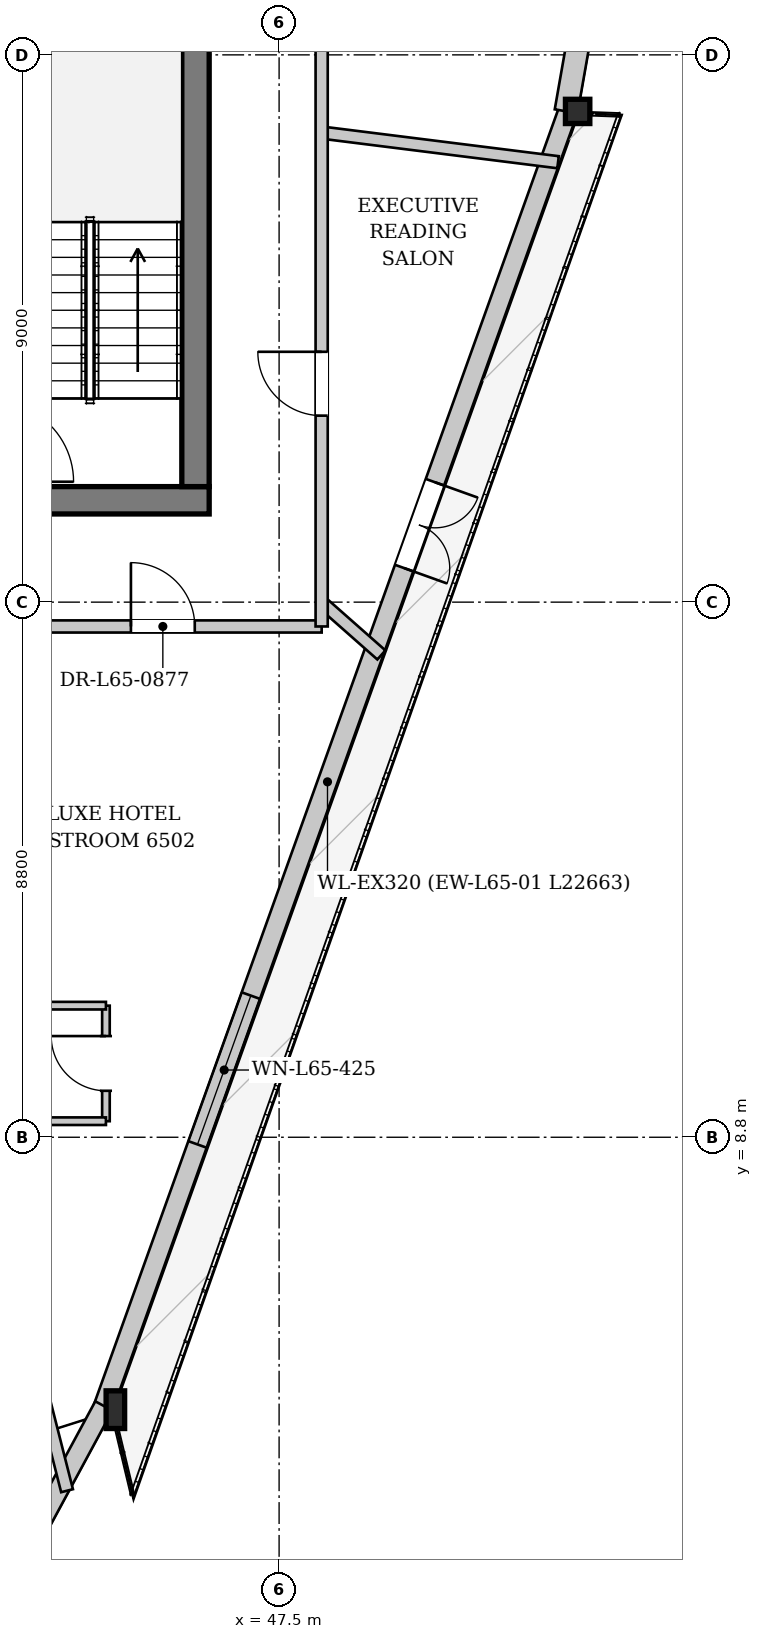
"""IFC4 building model, lengths in metres.
Left out: names, types, materials, properties, quantities, classifications, styles, units other than length and angle.
Written with IfcOpenShell. Run it as: python <this file> out.ifc"""

import sys

from ifc_helpers import new_model, si_unit, direction, frame, frame_2d, origin, origin_2d, place, context, subcontext, project, spatial, rectangle, i_section, extrude, source, transform, mapped, element, fill, save


model = new_model("IFC4")
c1 = context("Model", 3, precision=1e-05, world=origin(), true_north=direction((0.0, 1.0)))
c2 = subcontext(c1, "Body", "Model", "MODEL_VIEW")
j1 = project(units=[si_unit("LENGTHUNIT", "METRE"), si_unit("PLANEANGLEUNIT", "RADIAN")], contexts=[c1])
p1 = place(None, origin())
s1 = spatial("IfcSite", under=j1, at=p1, CompositionType="ELEMENT")
p2 = place(p1, origin())
s2 = spatial("IfcBuilding", under=s1, at=p2, CompositionType="ELEMENT")
p3 = place(p2, frame((0.0, 0.0, 245.3)))
s3 = spatial("IfcBuildingStorey", under=s2, at=p3, CompositionType="ELEMENT", Elevation=245.3)
m1 = source(origin(), c2, "Body", "SweptSolid", [
    extrude(i_section(OverallWidth=0.305, OverallDepth=0.62, WebThickness=0.021, FlangeThickness=0.04, at=origin_2d()), origin(), (0.0, 0.0, 1.0), 3.437),
])
p4 = place(p3, frame((44.759, 4.305, 0.0), z_axis=(0.028274763341, 0.008667138512, 0.999562613581), x_axis=(-0.293072848881, 0.956090113561, 0.0)))
e1 = element("IfcColumn", 1, at=p4, inside=s3, PredefinedType="COLUMN", context=c2, shape_type="MappedRepresentation", body=[
    mapped(m1, transform((0.0, 0.0, 0.0), x_axis=(1.0, 0.0, 0.0), y_axis=(0.0, 1.0, 0.0), z_axis=(0.0, 0.0, 1.0), scale=1.0)),
])
m2 = source(origin(), c2, "Body", "SweptSolid", [
    extrude(i_section(OverallWidth=0.401, OverallDepth=0.399, WebThickness=0.022, FlangeThickness=0.034, at=origin_2d()), origin(), (0.0, 0.0, 1.0), 3.436),
])
p5 = place(p3, frame((52.408, 25.639, 0.0), z_axis=(0.001208042101, 0.018262754122, 0.999832492194), x_axis=(-0.997819383739, 0.066003616823, 0.0)))
e2 = element("IfcColumn", 2, at=p5, inside=s3, PredefinedType="COLUMN", context=c2, shape_type="MappedRepresentation", body=[
    mapped(m2, transform((0.0, 0.0, 0.0), x_axis=(1.0, 0.0, 0.0), y_axis=(0.0, 1.0, 0.0), z_axis=(0.0, 0.0, 1.0), scale=1.0)),
])
p6 = place(p3, frame((52.257, 25.693, 0.0), z_axis=(0.0, 0.0, 1.0), x_axis=(-0.337512626034, -0.941321001183, 0.0)))
e3 = element("IfcWall", 3, at=p6, inside=s3, PredefinedType="SOLIDWALL", context=c2, shape_type="SweptSolid", body=[
    extrude(rectangle(XDim=22.663, YDim=0.32, at=frame_2d((11.332, 0.0))), origin(), (0.0, 0.0, 1.0), 2.872),
])
p7 = place(p6, frame((6.502, 0.0, 0.0)))
e4 = element("IfcOpeningElement", 4, at=p7, cuts=e3, PredefinedType="OPENING", context=c2, shape_type="SweptSolid", body=[
    extrude(rectangle(XDim=1.5, YDim=2.3, at=frame_2d((0.75, 1.15))), frame((0.0, 0.17, 0.0), z_axis=(0.0, -1.0, 0.0), x_axis=(1.0, 0.0, 0.0)), (0.0, 0.0, 1.0), 0.34),
])
p8 = place(p6, frame((15.471, 0.0, 0.402)))
e5 = element("IfcOpeningElement", 5, at=p8, cuts=e3, PredefinedType="OPENING", context=c2, shape_type="SweptSolid", body=[
    extrude(rectangle(XDim=2.6, YDim=2.35, at=frame_2d((1.3, 1.175))), frame((0.0, 0.17, 0.0), z_axis=(0.0, -1.0, 0.0), x_axis=(1.0, 0.0, 0.0)), (0.0, 0.0, 1.0), 0.34),
])
p9 = place(p3, frame((44.618, 4.381, 0.0), z_axis=(0.0, 0.0, 1.0), x_axis=(-0.475317706238, -0.879814229333, 0.0)))
e6 = element("IfcWall", 6, at=p9, inside=s3, PredefinedType="SOLIDWALL", context=c2, shape_type="SweptSolid", body=[
    extrude(rectangle(XDim=3.382, YDim=0.32, at=frame_2d((1.691, 0.0))), origin(), (0.0, 0.0, 1.0), 2.872),
])
p10 = place(p3, frame((56.146, 47.992, 0.0), z_axis=(0.0, 0.0, 1.0), x_axis=(-0.173221161048, -0.984882952114, 0.0)))
e7 = element("IfcWall", 7, at=p10, inside=s3, PredefinedType="SOLIDWALL", context=c2, shape_type="SweptSolid", body=[
    extrude(rectangle(XDim=22.663, YDim=0.38, at=frame_2d((11.332, 0.0))), origin(), (0.0, 0.0, 1.0), 2.872),
])
p11 = place(p10, frame((5.746, 0.0, 0.65)))
e8 = element("IfcOpeningElement", 8, at=p11, cuts=e7, PredefinedType="OPENING", context=c2, shape_type="SweptSolid", body=[
    extrude(rectangle(XDim=1.2, YDim=1.5, at=frame_2d((0.6, 0.75))), frame((0.0, 0.2, 0.0), z_axis=(0.0, -1.0, 0.0), x_axis=(1.0, 0.0, 0.0)), (0.0, 0.0, 1.0), 0.4),
])
p12 = place(p10, frame((15.718, 0.0, 0.65)))
e9 = element("IfcOpeningElement", 9, at=p12, cuts=e7, PredefinedType="OPENING", context=c2, shape_type="SweptSolid", body=[
    extrude(rectangle(XDim=1.2, YDim=1.5, at=frame_2d((0.6, 0.75))), frame((0.0, 0.2, 0.0), z_axis=(0.0, -1.0, 0.0), x_axis=(1.0, 0.0, 0.0)), (0.0, 0.0, 1.0), 0.4),
])
p13 = place(p3, frame((46.35, 19.275, 0.0), z_axis=(0.0, 0.0, 1.0), x_axis=(-1.0, 0.0, 0.0)))
e10 = element("IfcWall", 10, at=p13, inside=s3, PredefinedType="SHEAR", context=c2, shape_type="SweptSolid", body=[
    extrude(rectangle(XDim=16.7, YDim=0.45, at=frame_2d((8.35, 0.0))), origin(), (0.0, 0.0, 1.0), 3.38),
])
p14 = place(p13, frame((4.55, 0.0, 0.0)))
e11 = element("IfcOpeningElement", 11, at=p14, cuts=e10, PredefinedType="OPENING", context=c2, shape_type="SweptSolid", body=[
    extrude(rectangle(XDim=1.12, YDim=2.25, at=frame_2d((0.56, 1.125))), frame((0.0, 0.235, 0.0), z_axis=(0.0, -1.0, 0.0), x_axis=(1.0, 0.0, 0.0)), (0.0, 0.0, 1.0), 0.47),
])
p15 = place(p13, frame((11.05, 0.0, 0.0)))
e12 = element("IfcOpeningElement", 12, at=p15, cuts=e10, PredefinedType="OPENING", context=c2, shape_type="SweptSolid", body=[
    extrude(rectangle(XDim=1.12, YDim=2.25, at=frame_2d((0.56, 1.125))), frame((0.0, 0.235, 0.0), z_axis=(0.0, -1.0, 0.0), x_axis=(1.0, 0.0, 0.0)), (0.0, 0.0, 1.0), 0.47),
])
p16 = place(p3, frame((46.125, 33.7, 0.0), z_axis=(0.0, 0.0, 1.0), x_axis=(0.0, -1.0, 0.0)))
e13 = element("IfcWall", 13, at=p16, inside=s3, PredefinedType="SHEAR", context=c2, shape_type="SweptSolid", body=[
    extrude(rectangle(XDim=14.2, YDim=0.45, at=frame_2d((7.1, 0.0))), origin(), (0.0, 0.0, 1.0), 3.38),
])
p17 = place(p16, frame((5.18, 0.0, 0.0)))
e14 = element("IfcOpeningElement", 14, at=p17, cuts=e13, PredefinedType="OPENING", context=c2, shape_type="SweptSolid", body=[
    extrude(rectangle(XDim=1.6, YDim=2.2, at=frame_2d((0.8, 1.1))), frame((0.0, 0.235, 0.0), z_axis=(0.0, -1.0, 0.0), x_axis=(1.0, 0.0, 0.0)), (0.0, 0.0, 1.0), 0.47),
])
p18 = place(p16, frame((2.05, 0.0, 0.0)))
e15 = element("IfcOpeningElement", 15, at=p18, cuts=e13, PredefinedType="OPENING", context=c2, shape_type="SweptSolid", body=[
    extrude(rectangle(XDim=0.95, YDim=2.1, at=frame_2d((0.475, 1.05))), frame((0.0, 0.235, 0.0), z_axis=(0.0, -1.0, 0.0), x_axis=(1.0, 0.0, 0.0)), (0.0, 0.0, 1.0), 0.47),
])
p19 = place(p3, frame((40.394, 17.2, 0.0), z_axis=(0.0, 0.0, 1.0), x_axis=(0.246751762968, -0.969078720988, 0.0)))
e16 = element("IfcWall", 16, at=p19, inside=s3, PredefinedType="PARTITIONING", context=c2, shape_type="SweptSolid", body=[
    extrude(rectangle(XDim=14.666, YDim=0.2, at=frame_2d((7.333, 0.0))), origin(), (0.0, 0.0, 1.0), 3.055),
])
p20 = place(p3, frame((48.2, 17.598, 0.0), z_axis=(0.0, 0.0, 1.0), x_axis=(0.749810659064, -0.661652458284, 0.0)))
e17 = element("IfcWall", 17, at=p20, inside=s3, PredefinedType="PARTITIONING", context=c2, shape_type="SweptSolid", body=[
    extrude(rectangle(XDim=1.31, YDim=0.2, at=frame_2d((0.655, 0.0))), origin(), (0.0, 0.0, 1.0), 3.38),
])
p21 = place(p3, frame((48.2, 25.322, 0.0), z_axis=(0.0, 0.0, 1.0), x_axis=(0.992243327494, -0.124310816274, 0.0)))
e18 = element("IfcWall", 18, at=p21, inside=s3, PredefinedType="PARTITIONING", context=c2, shape_type="SweptSolid", body=[
    extrude(rectangle(XDim=3.918, YDim=0.2, at=frame_2d((1.959, 0.0))), origin(), (0.0, 0.0, 1.0), 3.38),
])
p22 = place(p3, frame((44.652, 9.064, 0.0), z_axis=(0.0, 0.0, 1.0), x_axis=(0.0, 1.0, 0.0)))
e19 = element("IfcWall", 19, at=p22, inside=s3, PredefinedType="PARTITIONING", context=c2, shape_type="SweptSolid", body=[
    extrude(rectangle(XDim=1.9, YDim=0.125, at=frame_2d((0.95, 0.0))), origin(), (0.0, 0.0, 1.0), 3.38),
])
p23 = place(p22, frame((0.5, 0.0, 0.0)))
e20 = element("IfcOpeningElement", 20, at=p23, cuts=e19, PredefinedType="OPENING", context=c2, shape_type="SweptSolid", body=[
    extrude(rectangle(XDim=0.9, YDim=2.1, at=frame_2d((0.45, 1.05))), frame((0.0, 0.073, 0.0), z_axis=(0.0, -1.0, 0.0), x_axis=(1.0, 0.0, 0.0)), (0.0, 0.0, 1.0), 0.145),
])
for number, where, z_axis, x_axis in (
    (21, (44.652, 10.964, 0.0), (0.0, 0.0, 1.0), (-1.0, 0.0, 0.0)),
    (22, (42.702, 9.064, 0.0), (0.0, 0.0, 1.0), (1.0, 0.0, 0.0)),
):
    element("IfcWall", number, at=place(p3, frame(where, z_axis=z_axis, x_axis=x_axis)), inside=s3, PredefinedType="PARTITIONING", context=c2, shape_type="SweptSolid", body=[
        extrude(rectangle(XDim=1.95, YDim=0.125, at=frame_2d((0.975, 0.0))), origin(), (0.0, 0.0, 1.0), 3.38),
    ])
p24 = place(p3, frame((27.8, 17.2, 0.0), z_axis=(0.0, 0.0, 1.0), x_axis=(1.0, 0.0, 0.0)))
e23 = element("IfcWall", 23, at=p24, inside=s3, PredefinedType="PARTITIONING", context=c2, shape_type="SweptSolid", body=[
    extrude(rectangle(XDim=20.4, YDim=0.2, at=frame_2d((10.2, 0.0))), origin(), (0.0, 0.0, 1.0), 3.38),
])
p25 = place(p24, frame((9.227, 0.0, 0.0)))
e24 = element("IfcOpeningElement", 24, at=p25, cuts=e23, PredefinedType="OPENING", context=c2, shape_type="SweptSolid", body=[
    extrude(rectangle(XDim=1.05, YDim=2.2, at=frame_2d((0.525, 1.1))), frame((0.0, 0.11, 0.0), z_axis=(0.0, -1.0, 0.0), x_axis=(1.0, 0.0, 0.0)), (0.0, 0.0, 1.0), 0.22),
])
p26 = place(p24, frame((17.263, 0.0, 0.0)))
e25 = element("IfcOpeningElement", 25, at=p26, cuts=e23, PredefinedType="OPENING", context=c2, shape_type="SweptSolid", body=[
    extrude(rectangle(XDim=1.05, YDim=2.2, at=frame_2d((0.525, 1.1))), frame((0.0, 0.11, 0.0), z_axis=(0.0, -1.0, 0.0), x_axis=(1.0, 0.0, 0.0)), (0.0, 0.0, 1.0), 0.22),
])
p27 = place(p24, frame((0.315, 0.0, 0.0)))
e26 = element("IfcOpeningElement", 26, at=p27, cuts=e23, PredefinedType="OPENING", context=c2, shape_type="SweptSolid", body=[
    extrude(rectangle(XDim=1.05, YDim=2.2, at=frame_2d((0.525, 1.1))), frame((0.0, 0.11, 0.0), z_axis=(0.0, -1.0, 0.0), x_axis=(1.0, 0.0, 0.0)), (0.0, 0.0, 1.0), 0.22),
])
p28 = place(p3, frame((48.2, 17.2, 0.0), z_axis=(0.0, 0.0, 1.0), x_axis=(0.0, 1.0, 0.0)))
e27 = element("IfcWall", 27, at=p28, inside=s3, PredefinedType="PARTITIONING", context=c2, shape_type="SweptSolid", body=[
    extrude(rectangle(XDim=18.8, YDim=0.2, at=frame_2d((9.4, 0.0))), origin(), (0.0, 0.0, 1.0), 3.065),
])
p29 = place(p28, frame((3.467, 0.0, 0.0)))
e28 = element("IfcOpeningElement", 28, at=p29, cuts=e27, PredefinedType="OPENING", context=c2, shape_type="SweptSolid", body=[
    extrude(rectangle(XDim=1.05, YDim=2.2, at=frame_2d((0.525, 1.1))), frame((0.0, 0.11, 0.0), z_axis=(0.0, -1.0, 0.0), x_axis=(1.0, 0.0, 0.0)), (0.0, 0.0, 1.0), 0.22),
])
p30 = place(p28, frame((10.22, 0.0, 0.0)))
e29 = element("IfcOpeningElement", 29, at=p30, cuts=e27, PredefinedType="OPENING", context=c2, shape_type="SweptSolid", body=[
    extrude(rectangle(XDim=1.05, YDim=2.2, at=frame_2d((0.525, 1.1))), frame((0.0, 0.11, 0.0), z_axis=(0.0, -1.0, 0.0), x_axis=(1.0, 0.0, 0.0)), (0.0, 0.0, 1.0), 0.22),
])
p31 = place(p28, frame((17.45, 0.0, 0.0)))
e30 = element("IfcOpeningElement", 30, at=p31, cuts=e27, PredefinedType="OPENING", context=c2, shape_type="SweptSolid", body=[
    extrude(rectangle(XDim=1.05, YDim=2.2, at=frame_2d((0.525, 1.1))), frame((0.0, 0.11, 0.0), z_axis=(0.0, -1.0, 0.0), x_axis=(1.0, 0.0, 0.0)), (0.0, 0.0, 1.0), 0.22),
])
m3 = source(origin(), c2, "Body", "SweptSolid", [
    extrude(rectangle(XDim=1.5, YDim=2.3, at=frame_2d((0.75, 1.15))), frame((0.0, 0.025, 0.0), z_axis=(0.0, -1.0, 0.0), x_axis=(1.0, 0.0, 0.0)), (0.0, 0.0, 1.0), 0.05),
])
p32 = place(p7, origin())
e31 = element("IfcDoor", 31, at=p32, inside=s3, OperationType="DOUBLE_DOOR_SINGLE_SWING", PredefinedType="DOOR", context=c2, shape_type="MappedRepresentation", body=[
    mapped(m3, transform((0.0, 0.0, 0.0), x_axis=(1.0, 0.0, 0.0), y_axis=(0.0, 1.0, 0.0), z_axis=(0.0, 0.0, 1.0), scale=1.0)),
])
fill(e4, e31)
m4 = source(origin(), c2, "Body", "SweptSolid", [
    extrude(rectangle(XDim=2.6, YDim=2.35, at=frame_2d((1.3, 1.175))), frame((0.0, 0.03, 0.0), z_axis=(0.0, -1.0, 0.0), x_axis=(1.0, 0.0, 0.0)), (0.0, 0.0, 1.0), 0.06),
])
p33 = place(p8, origin())
e32 = element("IfcWindow", 32, at=p33, inside=s3, PartitioningType="SINGLE_PANEL", PredefinedType="WINDOW", context=c2, shape_type="MappedRepresentation", body=[
    mapped(m4, transform((0.0, 0.0, 0.0), x_axis=(1.0, 0.0, 0.0), y_axis=(0.0, 1.0, 0.0), z_axis=(0.0, 0.0, 1.0), scale=1.0)),
])
fill(e5, e32)
m5 = source(origin(), c2, "Body", "SweptSolid", [
    extrude(rectangle(XDim=0.9, YDim=2.1, at=frame_2d((0.45, 1.05))), frame((0.0, 0.025, 0.0), z_axis=(0.0, -1.0, 0.0), x_axis=(1.0, 0.0, 0.0)), (0.0, 0.0, 1.0), 0.05),
])
p34 = place(p23, origin())
e33 = element("IfcDoor", 33, at=p34, inside=s3, OperationType="SINGLE_SWING_RIGHT", PredefinedType="DOOR", context=c2, shape_type="MappedRepresentation", body=[
    mapped(m5, transform((0.0, 0.0, 0.0), x_axis=(1.0, 0.0, 0.0), y_axis=(0.0, 1.0, 0.0), z_axis=(0.0, 0.0, 1.0), scale=1.0)),
])
fill(e20, e33)
m6 = source(origin(), c2, "Body", "SweptSolid", [
    extrude(rectangle(XDim=1.05, YDim=2.2, at=frame_2d((0.525, 1.1))), frame((0.0, 0.025, 0.0), z_axis=(0.0, -1.0, 0.0), x_axis=(1.0, 0.0, 0.0)), (0.0, 0.0, 1.0), 0.05),
])
p35 = place(p26, origin())
e34 = element("IfcDoor", 34, at=p35, inside=s3, OperationType="SINGLE_SWING_LEFT", PredefinedType="DOOR", context=c2, shape_type="MappedRepresentation", body=[
    mapped(m6, transform((0.0, 0.0, 0.0), x_axis=(1.0, 0.0, 0.0), y_axis=(0.0, 1.0, 0.0), z_axis=(0.0, 0.0, 1.0), scale=1.0)),
])
fill(e25, e34)
p36 = place(p29, origin())
e35 = element("IfcDoor", 35, at=p36, inside=s3, OperationType="SINGLE_SWING_RIGHT", PredefinedType="DOOR", context=c2, shape_type="MappedRepresentation", body=[
    mapped(m6, transform((0.0, 0.0, 0.0), x_axis=(1.0, 0.0, 0.0), y_axis=(0.0, 1.0, 0.0), z_axis=(0.0, 0.0, 1.0), scale=1.0)),
])
fill(e28, e35)
save(model, sys.argv[1])
